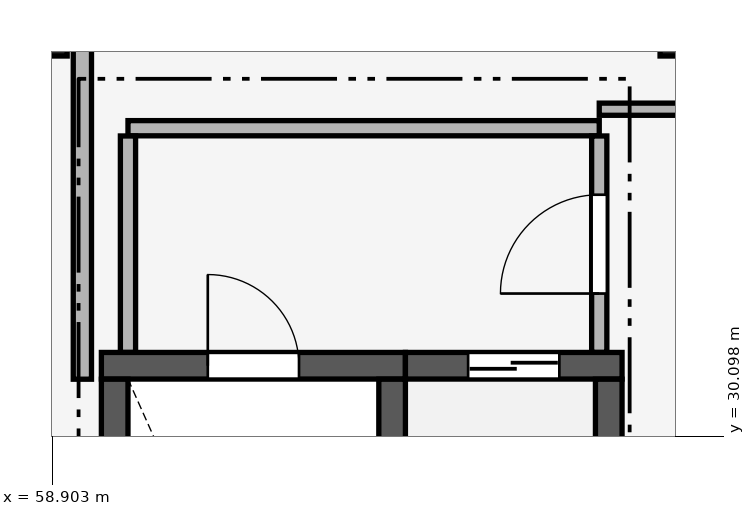
"""IFC4 building model, lengths in metres.
Left out: names, types, materials, properties, quantities, classifications, styles, units other than length and angle.
Written with IfcOpenShell. Run it as: python <this file> out.ifc"""

import sys

from ifc_helpers import new_model, si_unit, direction, frame, frame_2d, origin, origin_2d, place, context, subcontext, project, spatial, rectangle, extrude, element, fill, save


model = new_model("IFC4")
c1 = context("Model", 3, precision=1e-05, world=origin(), true_north=direction((0.0, 1.0)))
c2 = subcontext(c1, "Body", "Model", "MODEL_VIEW")
j1 = project(units=[si_unit("LENGTHUNIT", "METRE"), si_unit("PLANEANGLEUNIT", "RADIAN")], contexts=[c1])
p1 = place(None, origin())
s1 = spatial("IfcSite", under=j1, at=p1, CompositionType="ELEMENT")
p2 = place(p1, origin())
s2 = spatial("IfcBuilding", under=s1, at=p2, CompositionType="ELEMENT")
p3 = place(p2, frame((0.0, 0.0, 20.4)))
s3 = spatial("IfcBuildingStorey", under=s2, at=p3, CompositionType="ELEMENT", Elevation=20.4)
for number, where, z_axis, x_axis in (
    (1, (58.8, 35.4, 0.0), (0.0, 0.0, 1.0), (1.0, 0.0, 0.0)),
    (2, (67.2, 35.4, 0.0), (0.0, 0.0, 1.0), (1.0, 0.0, 0.0)),
):
    element("IfcColumn", number, at=place(p3, frame(where, z_axis=z_axis, x_axis=x_axis)), inside=s3, PredefinedType="COLUMN", context=c2, shape_type="SweptSolid", body=[
        extrude(rectangle(XDim=0.6, YDim=0.6, at=origin_2d()), origin(), (0.0, 0.0, 1.0), 4.8),
    ])
p4 = place(p3, frame((59.55, 31.025, 0.0), z_axis=(0.0, 0.0, 1.0), x_axis=(1.0, 0.0, 0.0)))
e3 = element("IfcWall", 3, at=p4, inside=s3, PredefinedType="SHEAR", context=c2, shape_type="SweptSolid", body=[
    extrude(rectangle(XDim=4.0, YDim=0.35, at=frame_2d((2.0, 0.0))), origin(), (0.0, 0.0, 1.0), 4.55),
])
p5 = place(p4, frame((1.4, 0.0, 0.0)))
e4 = element("IfcOpeningElement", 4, at=p5, cuts=e3, PredefinedType="OPENING", context=c2, shape_type="SweptSolid", body=[
    extrude(rectangle(XDim=1.2, YDim=2.2, at=frame_2d((0.6, 1.1))), frame((0.0, 0.19, 0.0), z_axis=(0.0, -1.0, 0.0), x_axis=(1.0, 0.0, 0.0)), (0.0, 0.0, 1.0), 0.38),
])
for number, where, z_axis, x_axis in (
    (5, (59.725, 23.452, 0.0), (0.0, 0.0, 1.0), (0.0, 1.0, 0.0)),
    (6, (63.375, 23.452, 0.0), (0.0, 0.0, 1.0), (0.0, 1.0, 0.0)),
):
    element("IfcWall", number, at=place(p3, frame(where, z_axis=z_axis, x_axis=x_axis)), inside=s3, PredefinedType="SHEAR", context=c2, shape_type="SweptSolid", body=[
        extrude(rectangle(XDim=7.396, YDim=0.35, at=frame_2d((3.698, 0.0))), origin(), (0.0, 0.0, 1.0), 4.55),
    ])
p6 = place(p3, frame((63.55, 31.025, 0.0), z_axis=(0.0, 0.0, 1.0), x_axis=(1.0, 0.0, 0.0)))
e7 = element("IfcWall", 7, at=p6, inside=s3, PredefinedType="SHEAR", context=c2, shape_type="SweptSolid", body=[
    extrude(rectangle(XDim=2.85, YDim=0.35, at=frame_2d((1.425, 0.0))), origin(), (0.0, 0.0, 1.0), 4.55),
])
p7 = place(p6, frame((0.825, 0.0, 0.0)))
e8 = element("IfcOpeningElement", 8, at=p7, cuts=e7, PredefinedType="OPENING", context=c2, shape_type="SweptSolid", body=[
    extrude(rectangle(XDim=1.2, YDim=2.15, at=frame_2d((0.6, 1.075))), frame((0.0, 0.19, 0.0), z_axis=(0.0, -1.0, 0.0), x_axis=(1.0, 0.0, 0.0)), (0.0, 0.0, 1.0), 0.38),
])
p8 = place(p3, frame((66.225, 28.052, 0.0), z_axis=(0.0, 0.0, 1.0), x_axis=(0.0, 1.0, 0.0)))
e9 = element("IfcWall", 9, at=p8, inside=s3, PredefinedType="SHEAR", context=c2, shape_type="SweptSolid", body=[
    extrude(rectangle(XDim=2.796, YDim=0.35, at=frame_2d((1.398, 0.0))), origin(), (0.0, 0.0, 1.0), 4.55),
])
p9 = place(p3, frame((59.9, 34.15, 0.0), z_axis=(0.0, 0.0, 1.0), x_axis=(1.0, 0.0, 0.0)))
e10 = element("IfcWall", 10, at=p9, inside=s3, PredefinedType="PARTITIONING", context=c2, shape_type="SweptSolid", body=[
    extrude(rectangle(XDim=6.2, YDim=0.2, at=frame_2d((3.1, 0.0))), origin(), (0.0, 0.0, 1.0), 4.55),
])
p10 = place(p3, frame((66.1, 34.4, 0.0), z_axis=(0.0, 0.0, 1.0), x_axis=(1.0, 0.0, 0.0)))
e11 = element("IfcWall", 11, at=p10, inside=s3, PredefinedType="PARTITIONING", context=c2, shape_type="SweptSolid", body=[
    extrude(rectangle(XDim=2.7, YDim=0.16, at=frame_2d((1.35, 0.0))), origin(), (0.0, 0.0, 1.0), 3.85),
])
p11 = place(p3, frame((59.3, 30.848, 0.0), z_axis=(0.0, 0.0, 1.0), x_axis=(0.0, 1.0, 0.0)))
e12 = element("IfcWall", 12, at=p11, inside=s3, PredefinedType="PARTITIONING", context=c2, shape_type="SweptSolid", body=[
    extrude(rectangle(XDim=4.38, YDim=0.24, at=frame_2d((2.19, 0.0))), origin(), (0.0, 0.0, 1.0), 3.85),
])
p12 = place(p3, frame((59.9, 31.202, 0.0), z_axis=(0.0, 0.0, 1.0), x_axis=(0.0, 1.0, 0.0)))
e13 = element("IfcWall", 13, at=p12, inside=s3, PredefinedType="PARTITIONING", context=c2, shape_type="SweptSolid", body=[
    extrude(rectangle(XDim=2.846, YDim=0.2, at=frame_2d((1.423, 0.0))), origin(), (0.0, 0.0, 1.0), 4.25),
])
p13 = place(p3, frame((66.1, 31.202, 0.0), z_axis=(0.0, 0.0, 1.0), x_axis=(0.0, 1.0, 0.0)))
e14 = element("IfcWall", 14, at=p13, inside=s3, PredefinedType="PARTITIONING", context=c2, shape_type="SweptSolid", body=[
    extrude(rectangle(XDim=2.846, YDim=0.2, at=frame_2d((1.423, 0.0))), origin(), (0.0, 0.0, 1.0), 4.25),
])
p14 = place(p13, frame((0.773, 0.0, 0.0)))
e15 = element("IfcOpeningElement", 15, at=p14, cuts=e14, PredefinedType="OPENING", context=c2, shape_type="SweptSolid", body=[
    extrude(rectangle(XDim=1.3, YDim=2.2, at=frame_2d((0.65, 1.1))), frame((0.0, 0.115, 0.0), z_axis=(0.0, -1.0, 0.0), x_axis=(1.0, 0.0, 0.0)), (0.0, 0.0, 1.0), 0.23),
])
p15 = place(p5, origin())
e16 = element("IfcDoor", 16, at=p15, inside=s3, OperationType="SINGLE_SWING_LEFT", PredefinedType="DOOR", context=c2, shape_type="SweptSolid", body=[
    extrude(rectangle(XDim=1.2, YDim=2.2, at=frame_2d((0.6, 1.1))), frame((0.0, 0.025, 0.0), z_axis=(0.0, -1.0, 0.0), x_axis=(1.0, 0.0, 0.0)), (0.0, 0.0, 1.0), 0.05),
])
fill(e4, e16)
p16 = place(p7, origin())
e17 = element("IfcDoor", 17, at=p16, inside=s3, OperationType="DOUBLE_DOOR_SLIDING", PredefinedType="DOOR", context=c2, shape_type="SweptSolid", body=[
    extrude(rectangle(XDim=1.2, YDim=2.15, at=frame_2d((0.6, 1.075))), frame((0.0, 0.025, 0.0), z_axis=(0.0, -1.0, 0.0), x_axis=(1.0, 0.0, 0.0)), (0.0, 0.0, 1.0), 0.05),
])
fill(e8, e17)
p17 = place(p14, origin())
e18 = element("IfcDoor", 18, at=p17, inside=s3, OperationType="SINGLE_SWING_LEFT", PredefinedType="DOOR", context=c2, shape_type="SweptSolid", body=[
    extrude(rectangle(XDim=1.3, YDim=2.2, at=frame_2d((0.65, 1.1))), frame((0.0, 0.025, 0.0), z_axis=(0.0, -1.0, 0.0), x_axis=(1.0, 0.0, 0.0)), (0.0, 0.0, 1.0), 0.05),
])
fill(e15, e18)
save(model, sys.argv[1])
